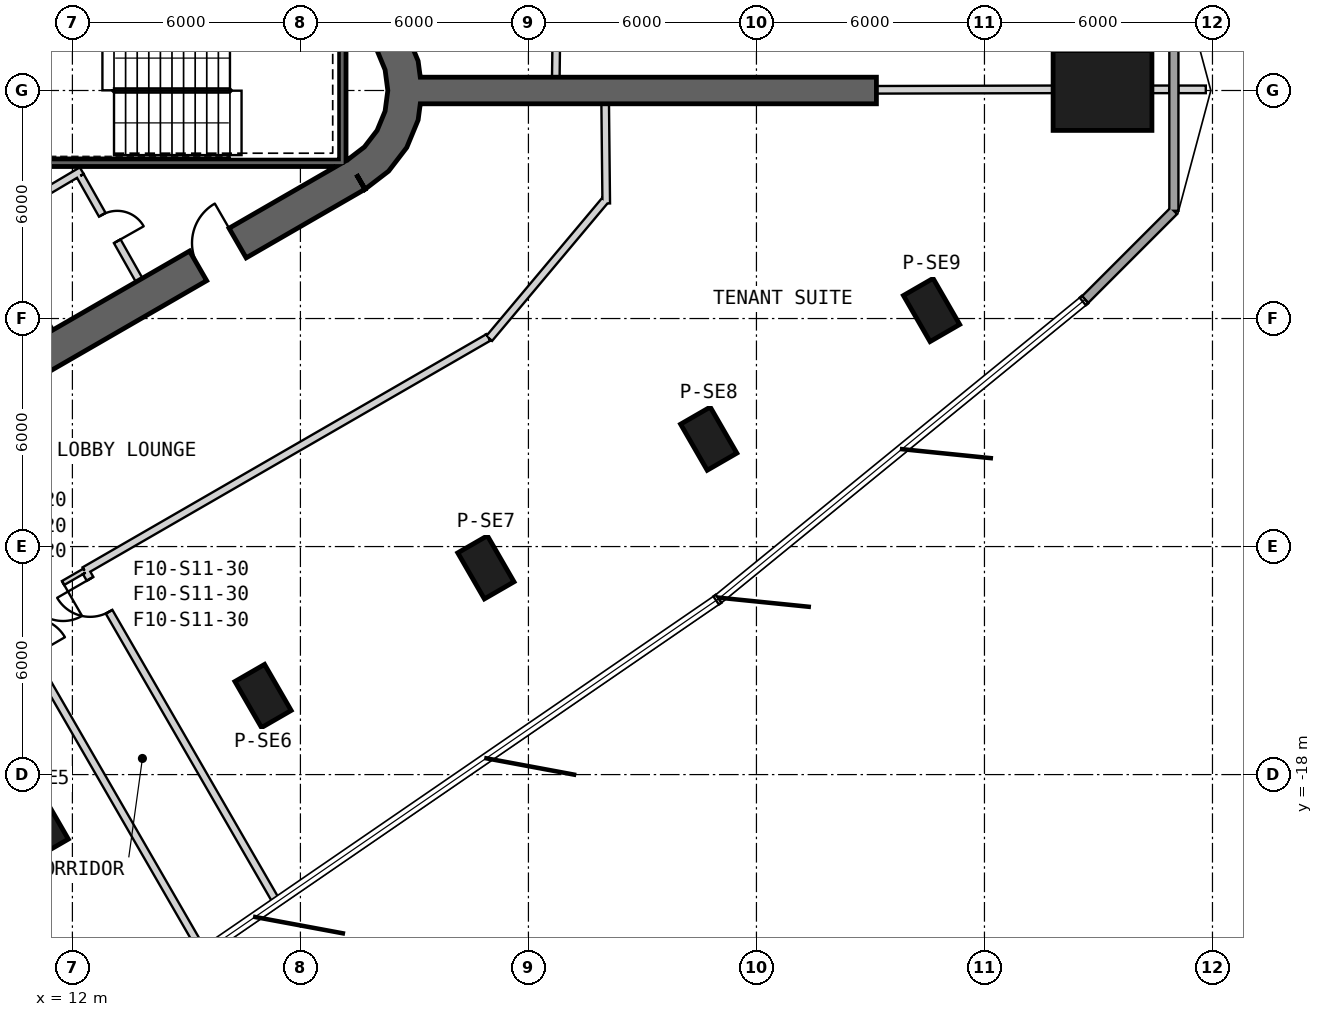
"""IFC4 building model, lengths in metres.
Left out: names, types, materials, properties, quantities, classifications, styles, units other than length and angle.
Written with IfcOpenShell. Run it as: python <this file> out.ifc"""

import sys

from ifc_helpers import new_model, si_unit, direction, frame, frame_2d, origin, origin_2d, place, context, subcontext, project, spatial, polyline, rectangle, outline, extrude, element, fill, save


model = new_model("IFC4")
c1 = context("Model", 3, precision=1e-05, world=origin(), true_north=direction((0.0, 1.0)))
c2 = subcontext(c1, "Body", "Model", "MODEL_VIEW")
j1 = project(units=[si_unit("LENGTHUNIT", "METRE"), si_unit("PLANEANGLEUNIT", "RADIAN")], contexts=[c1])
p1 = place(None, origin())
s1 = spatial("IfcSite", under=j1, at=p1, CompositionType="ELEMENT")
p2 = place(p1, origin())
s2 = spatial("IfcBuilding", under=s1, at=p2, CompositionType="ELEMENT")
p3 = place(p2, frame((0.0, 0.0, 193.2)))
s3 = spatial("IfcBuildingStorey", under=s2, at=p3, CompositionType="ELEMENT", Elevation=193.2)
p4 = place(p3, frame((39.107, 0.0, 0.0), z_axis=(0.0, 0.0, 1.0), x_axis=(1.0, 0.0, 0.0)))
e1 = element("IfcColumn", 1, at=p4, inside=s3, PredefinedType="COLUMN", context=c2, shape_type="SweptSolid", body=[
    extrude(rectangle(XDim=2.6, YDim=2.1, at=origin_2d()), origin(), (0.0, 0.0, 1.0), 4.0),
])
for number, where, z_axis, x_axis in (
    (2, (11.153, -19.317, 0.0), (0.0, 0.0, 1.0), (0.5, -0.866, 0.0)),
    (3, (17.017, -15.932, 0.0), (0.0, 0.0, 1.0), (0.5, -0.866, 0.0)),
    (4, (22.881, -12.546, 0.0), (0.0, 0.0, 1.0), (0.5, -0.866, 0.0)),
    (5, (28.744, -9.161, 0.0), (0.0, 0.0, 1.0), (0.5, -0.866, 0.0)),
    (6, (34.608, -5.775, 0.0), (0.0, 0.0, 1.0), (0.5, -0.866, 0.0)),
):
    element("IfcColumn", number, at=place(p3, frame(where, z_axis=z_axis, x_axis=x_axis)), inside=s3, PredefinedType="COLUMN", context=c2, shape_type="SweptSolid", body=[
        extrude(rectangle(XDim=1.4, YDim=0.9, at=origin_2d()), origin(), (0.0, 0.0, 1.0), 4.0),
    ])
p5 = place(p3, frame((-7.825, -17.97, 0.0), z_axis=(0.0, 0.0, 1.0), x_axis=(0.866028369851, 0.499994862586, 0.0)))
e7 = element("IfcWall", 7, at=p5, inside=s3, PredefinedType="SHEAR", context=c2, shape_type="SweptSolid", body=[
    extrude(rectangle(XDim=31.523, YDim=0.9, at=frame_2d((15.762, 0.0))), origin(), (0.0, 0.0, 1.0), 4.0),
])
p6 = place(p5, frame((7.062, 0.0, 0.0)))
e8 = element("IfcOpeningElement", 8, at=p6, cuts=e7, PredefinedType="OPENING", context=c2, shape_type="SweptSolid", body=[
    extrude(rectangle(XDim=1.2, YDim=2.4, at=frame_2d((0.6, 1.2))), frame((0.0, 0.46, 0.0), z_axis=(0.0, -1.0, 0.0), x_axis=(1.0, 0.0, 0.0)), (0.0, 0.0, 1.0), 0.92),
])
p7 = place(p5, frame((9.762, 0.0, 0.0)))
e9 = element("IfcOpeningElement", 9, at=p7, cuts=e7, PredefinedType="OPENING", context=c2, shape_type="SweptSolid", body=[
    extrude(rectangle(XDim=1.2, YDim=2.4, at=frame_2d((0.6, 1.2))), frame((0.0, 0.46, 0.0), z_axis=(0.0, -1.0, 0.0), x_axis=(1.0, 0.0, 0.0)), (0.0, 0.0, 1.0), 0.92),
])
p8 = place(p5, frame((12.462, 0.0, 0.0)))
e10 = element("IfcOpeningElement", 10, at=p8, cuts=e7, PredefinedType="OPENING", context=c2, shape_type="SweptSolid", body=[
    extrude(rectangle(XDim=1.2, YDim=2.4, at=frame_2d((0.6, 1.2))), frame((0.0, 0.46, 0.0), z_axis=(0.0, -1.0, 0.0), x_axis=(1.0, 0.0, 0.0)), (0.0, 0.0, 1.0), 0.92),
])
p9 = place(p5, frame((15.162, 0.0, 0.0)))
e11 = element("IfcOpeningElement", 11, at=p9, cuts=e7, PredefinedType="OPENING", context=c2, shape_type="SweptSolid", body=[
    extrude(rectangle(XDim=1.2, YDim=2.4, at=frame_2d((0.6, 1.2))), frame((0.0, 0.46, 0.0), z_axis=(0.0, -1.0, 0.0), x_axis=(1.0, 0.0, 0.0)), (0.0, 0.0, 1.0), 0.92),
])
p10 = place(p5, frame((17.862, 0.0, 0.0)))
e12 = element("IfcOpeningElement", 12, at=p10, cuts=e7, PredefinedType="OPENING", context=c2, shape_type="SweptSolid", body=[
    extrude(rectangle(XDim=1.2, YDim=2.4, at=frame_2d((0.6, 1.2))), frame((0.0, 0.46, 0.0), z_axis=(0.0, -1.0, 0.0), x_axis=(1.0, 0.0, 0.0)), (0.0, 0.0, 1.0), 0.92),
])
p11 = place(p5, frame((20.562, 0.0, 0.0)))
e13 = element("IfcOpeningElement", 13, at=p11, cuts=e7, PredefinedType="OPENING", context=c2, shape_type="SweptSolid", body=[
    extrude(rectangle(XDim=1.2, YDim=2.4, at=frame_2d((0.6, 1.2))), frame((0.0, 0.46, 0.0), z_axis=(0.0, -1.0, 0.0), x_axis=(1.0, 0.0, 0.0)), (0.0, 0.0, 1.0), 0.92),
])
p12 = place(p5, frame((26.712, 0.0, 0.0)))
e14 = element("IfcOpeningElement", 14, at=p12, cuts=e7, PredefinedType="OPENING", context=c2, shape_type="SweptSolid", body=[
    extrude(rectangle(XDim=1.2, YDim=2.4, at=frame_2d((0.6, 1.2))), frame((0.0, 0.46, 0.0), z_axis=(0.0, -1.0, 0.0), x_axis=(1.0, 0.0, 0.0)), (0.0, 0.0, 1.0), 0.92),
])
p13 = place(p5, frame((3.612, 0.0, 0.0)))
e15 = element("IfcOpeningElement", 15, at=p13, cuts=e7, PredefinedType="OPENING", context=c2, shape_type="SweptSolid", body=[
    extrude(rectangle(XDim=1.2, YDim=2.4, at=frame_2d((0.6, 1.2))), frame((0.0, 0.46, 0.0), z_axis=(0.0, -1.0, 0.0), x_axis=(1.0, 0.0, 0.0)), (0.0, 0.0, 1.0), 0.92),
])
p14 = place(p3, origin())
e16 = element("IfcWall", 16, at=p14, inside=s3, PredefinedType="SHEAR", context=c2, shape_type="SweptSolid", body=[
    extrude(outline(polyline([(19.7, -2.598), (20.321, -2.121), (20.798, -1.5), (21.098, -0.777), (21.2, 0.0), (21.098, 0.777), (20.798, 1.5), (20.321, 2.121), (19.7, 2.598), (19.25, 1.819), (19.685, 1.485), (20.019, 1.05), (20.229, 0.543), (20.3, 0.0), (20.229, -0.543), (20.019, -1.05), (19.685, -1.485), (19.25, -1.819), (19.7, -2.598)])), origin(), (0.0, 0.0, 1.0), 4.0),
])
p15 = place(p3, frame((21.15, 0.0, 0.0), z_axis=(0.0, 0.0, 1.0), x_axis=(1.0, 0.0, 0.0)))
e17 = element("IfcWall", 17, at=p15, inside=s3, PredefinedType="SHEAR", context=c2, shape_type="SweptSolid", body=[
    extrude(rectangle(XDim=12.007, YDim=0.7, at=frame_2d((6.003, 0.0))), origin(), (0.0, 0.0, 1.0), 4.0),
])
p16 = place(p3, frame((38.649, -5.501, 0.0), z_axis=(0.0, 0.0, 1.0), x_axis=(0.707106781187, 0.707106781187, 0.0)))
e18 = element("IfcWall", 18, at=p16, inside=s3, PredefinedType="SOLIDWALL", context=c2, shape_type="SweptSolid", body=[
    extrude(rectangle(XDim=3.303, YDim=0.24, at=frame_2d((1.652, 0.0))), origin(), (0.0, 0.0, 1.0), 3.7),
])
p17 = place(p3, frame((40.984, -3.165, 0.0), z_axis=(0.0, 0.0, 1.0), x_axis=(0.0, 1.0, 0.0)))
e19 = element("IfcWall", 19, at=p17, inside=s3, PredefinedType="SOLIDWALL", context=c2, shape_type="SweptSolid", body=[
    extrude(rectangle(XDim=6.331, YDim=0.24, at=frame_2d((3.165, 0.0))), origin(), (0.0, 0.0, 1.0), 3.7),
])
p18 = place(p3, frame((9.795, -3.525, 0.0), z_axis=(0.0, 0.0, 1.0), x_axis=(0.499984717929, -0.866034226713, 0.0)))
e20 = element("IfcWall", 20, at=p18, inside=s3, PredefinedType="PLUMBINGWALL", context=c2, shape_type="SweptSolid", body=[
    extrude(rectangle(XDim=3.25, YDim=0.2, at=frame_2d((1.625, 0.0))), origin(), (0.0, 0.0, 1.0), 3.7),
])
p19 = place(p3, frame((19.1, -2.0, -0.3), z_axis=(0.0, 0.0, 1.0), x_axis=(0.0, 1.0, 0.0)))
e21 = element("IfcWall", 21, at=p19, inside=s3, PredefinedType="SHEAR", context=c2, shape_type="SweptSolid", body=[
    extrude(rectangle(XDim=3.8, YDim=0.2, at=frame_2d((1.9, 0.0))), origin(), (0.0, 0.0, 1.0), 4.0),
])
p20 = place(p3, frame((11.1, -1.9, -0.3), z_axis=(0.0, 0.0, 1.0), x_axis=(1.0, 0.0, 0.0)))
e22 = element("IfcWall", 22, at=p20, inside=s3, PredefinedType="SHEAR", context=c2, shape_type="SweptSolid", body=[
    extrude(rectangle(XDim=7.9, YDim=0.2, at=frame_2d((3.95, 0.0))), origin(), (0.0, 0.0, 1.0), 4.0),
])
p21 = place(p3, frame((12.245, -2.109, 0.0), z_axis=(0.0, 0.0, 1.0), x_axis=(-0.860414880418, -0.509594185166, 0.0)))
e23 = element("IfcWall", 23, at=p21, inside=s3, PredefinedType="PARTITIONING", context=c2, shape_type="SweptSolid", body=[
    extrude(rectangle(XDim=2.7, YDim=0.2, at=frame_2d((1.35, 0.0))), origin(), (0.0, 0.0, 1.0), 3.7),
])
p22 = place(p3, frame((13.758, -4.99, 0.0), z_axis=(0.0, 0.0, 1.0), x_axis=(-0.491993409184, 0.87059892334, 0.0)))
e24 = element("IfcWall", 24, at=p22, inside=s3, PredefinedType="PARTITIONING", context=c2, shape_type="SweptSolid", body=[
    extrude(rectangle(XDim=3.15, YDim=0.2, at=frame_2d((1.575, 0.0))), origin(), (0.0, 0.0, 1.0), 3.7),
])
p23 = place(p22, frame((1.175, 0.0, 0.0)))
e25 = element("IfcOpeningElement", 25, at=p23, cuts=e24, PredefinedType="OPENING", context=c2, shape_type="SweptSolid", body=[
    extrude(rectangle(XDim=0.8, YDim=2.1, at=frame_2d((0.4, 1.05))), frame((0.0, 0.11, 0.0), z_axis=(0.0, -1.0, 0.0), x_axis=(1.0, 0.0, 0.0)), (0.0, 0.0, 1.0), 0.22),
])
p24 = place(p3, frame((24.721, 0.35, 0.0), z_axis=(0.0, 0.0, 1.0), x_axis=(0.012552857034, 0.999921209786, 0.0)))
e26 = element("IfcWall", 26, at=p24, inside=s3, PredefinedType="PARTITIONING", context=c2, shape_type="SweptSolid", body=[
    extrude(rectangle(XDim=1.984, YDim=0.2, at=frame_2d((0.992, 0.0))), origin(), (0.0, 0.0, 1.0), 3.7),
])
p25 = place(p3, frame((12.317, -12.634, 0.0), z_axis=(0.0, 0.0, 1.0), x_axis=(-0.86602648383, -0.499998129301, 0.0)))
e27 = element("IfcWall", 27, at=p25, inside=s3, PredefinedType="PARTITIONING", context=c2, shape_type="SweptSolid", body=[
    extrude(rectangle(XDim=2.3, YDim=0.12, at=frame_2d((1.15, 0.0))), origin(), (0.0, 0.0, 1.0), 3.7),
])
p26 = place(p25, frame((0.65, 0.0, 0.0)))
e28 = element("IfcOpeningElement", 28, at=p26, cuts=e27, PredefinedType="OPENING", context=c2, shape_type="SweptSolid", body=[
    extrude(rectangle(XDim=1.0, YDim=2.1, at=frame_2d((0.5, 1.05))), frame((0.0, 0.07, 0.0), z_axis=(0.0, -1.0, 0.0), x_axis=(1.0, 0.0, 0.0)), (0.0, 0.0, 1.0), 0.14),
])
p27 = place(p3, frame((26.047, -2.972, 0.0), z_axis=(0.0, 0.0, 1.0), x_axis=(-0.010519853563, 0.99994466481, 0.0)))
e29 = element("IfcWall", 29, at=p27, inside=s3, PredefinedType="PARTITIONING", context=c2, shape_type="SweptSolid", body=[
    extrude(rectangle(XDim=2.623, YDim=0.2, at=frame_2d((1.311, 0.0))), origin(), (0.0, 0.0, 1.0), 3.7),
])
p28 = place(p3, frame((22.968, -6.524, 0.0), z_axis=(0.0, 0.0, 1.0), x_axis=(0.642764400317, 0.766063917493, 0.0)))
e30 = element("IfcWall", 30, at=p28, inside=s3, PredefinedType="PARTITIONING", context=c2, shape_type="SweptSolid", body=[
    extrude(rectangle(XDim=4.74, YDim=0.2, at=frame_2d((2.37, 0.0))), origin(), (0.0, 0.0, 1.0), 2.78),
])
p29 = place(p3, frame((12.317, -12.634, 0.0), z_axis=(0.0, 0.0, 1.0), x_axis=(0.866028561818, 0.499994530085, 0.0)))
e31 = element("IfcWall", 31, at=p29, inside=s3, PredefinedType="PARTITIONING", context=c2, shape_type="SweptSolid", body=[
    extrude(rectangle(XDim=12.273, YDim=0.2, at=frame_2d((6.136, 0.0))), origin(), (0.0, 0.0, 1.0), 2.88),
])
p30 = place(p3, frame((33.157, 0.018, 0.0), z_axis=(0.0, 0.0, 1.0), x_axis=(0.999996690576, 0.002572710167, 0.0)))
e32 = element("IfcWall", 32, at=p30, inside=s3, PredefinedType="PARTITIONING", context=c2, shape_type="SweptSolid", body=[
    extrude(rectangle(XDim=4.65, YDim=0.2, at=frame_2d((2.325, 0.0))), origin(), (0.0, 0.0, 1.0), 3.27),
])
p31 = place(p3, frame((40.407, 0.03, 0.0), z_axis=(0.0, 0.0, 1.0), x_axis=(1.0, 0.0, 0.0)))
e33 = element("IfcWall", 33, at=p31, inside=s3, PredefinedType="PARTITIONING", context=c2, shape_type="SweptSolid", body=[
    extrude(rectangle(XDim=0.458, YDim=0.2, at=frame_2d((0.229, 0.0))), origin(), (0.0, 0.0, 1.0), 3.7),
])
p32 = place(p3, frame((41.104, 0.03, 0.0), z_axis=(0.0, 0.0, 1.0), x_axis=(1.0, 0.0, 0.0)))
e34 = element("IfcWall", 34, at=p32, inside=s3, PredefinedType="PARTITIONING", context=c2, shape_type="SweptSolid", body=[
    extrude(rectangle(XDim=0.72, YDim=0.2, at=frame_2d((0.36, 0.0))), origin(), (0.0, 0.0, 1.0), 3.7),
])
p33 = place(p3, frame((17.375, -21.355, 0.0), z_axis=(0.0, 0.0, 1.0), x_axis=(-0.500014165022, 0.866017225451, 0.0)))
e35 = element("IfcWall", 35, at=p33, inside=s3, PredefinedType="PARTITIONING", context=c2, shape_type="SweptSolid", body=[
    extrude(rectangle(XDim=10.022, YDim=0.2, at=frame_2d((5.011, 0.0))), origin(), (0.0, 0.0, 1.0), 3.7),
])
p34 = place(p33, frame((8.822, 0.0, 0.0)))
e36 = element("IfcOpeningElement", 36, at=p34, cuts=e35, PredefinedType="OPENING", context=c2, shape_type="SweptSolid", body=[
    extrude(rectangle(XDim=1.0, YDim=2.1, at=frame_2d((0.5, 1.05))), frame((0.0, 0.11, 0.0), z_axis=(0.0, -1.0, 0.0), x_axis=(1.0, 0.0, 0.0)), (0.0, 0.0, 1.0), 0.22),
])
p35 = place(p3, frame((10.338, -13.846, 0.0), z_axis=(0.0, 0.0, 1.0), x_axis=(0.499983401189, -0.8660349869, 0.0)))
e37 = element("IfcWall", 37, at=p35, inside=s3, PredefinedType="PARTITIONING", context=c2, shape_type="SweptSolid", body=[
    extrude(rectangle(XDim=10.204, YDim=0.2, at=frame_2d((5.102, 0.0))), origin(), (0.0, 0.0, 1.0), 3.7),
])
p36 = place(p35, frame((0.2, 0.0, 0.0)))
e38 = element("IfcOpeningElement", 38, at=p36, cuts=e37, PredefinedType="OPENING", context=c2, shape_type="SweptSolid", body=[
    extrude(rectangle(XDim=1.0, YDim=2.1, at=frame_2d((0.5, 1.05))), frame((0.0, 0.11, 0.0), z_axis=(0.0, -1.0, 0.0), x_axis=(1.0, 0.0, 0.0)), (0.0, 0.0, 1.0), 0.22),
])
p37 = place(p23, origin())
e39 = element("IfcDoor", 39, at=p37, inside=s3, OperationType="SINGLE_SWING_LEFT", PredefinedType="USERDEFINED", context=c2, shape_type="SweptSolid", body=[
    extrude(rectangle(XDim=0.8, YDim=2.1, at=frame_2d((0.4, 1.05))), frame((0.0, 0.025, 0.0), z_axis=(0.0, -1.0, 0.0), x_axis=(1.0, 0.0, 0.0)), (0.0, 0.0, 1.0), 0.05),
])
fill(e25, e39)
p38 = place(p26, origin())
e40 = element("IfcDoor", 40, at=p38, inside=s3, OperationType="SINGLE_SWING_RIGHT", PredefinedType="NOTDEFINED", context=c2, shape_type="SweptSolid", body=[
    extrude(rectangle(XDim=1.0, YDim=2.1, at=frame_2d((0.5, 1.05))), frame((0.0, 0.025, 0.0), z_axis=(0.0, -1.0, 0.0), x_axis=(1.0, 0.0, 0.0)), (0.0, 0.0, 1.0), 0.05),
])
fill(e28, e40)
p39 = place(p34, origin())
e41 = element("IfcDoor", 41, at=p39, inside=s3, OperationType="SINGLE_SWING_LEFT", PredefinedType="USERDEFINED", context=c2, shape_type="SweptSolid", body=[
    extrude(rectangle(XDim=1.0, YDim=2.1, at=frame_2d((0.5, 1.05))), frame((0.0, 0.025, 0.0), z_axis=(0.0, -1.0, 0.0), x_axis=(1.0, 0.0, 0.0)), (0.0, 0.0, 1.0), 0.05),
])
fill(e36, e41)
p40 = place(p12, origin())
e42 = element("IfcDoor", 42, at=p40, inside=s3, OperationType="SINGLE_SWING_RIGHT", PredefinedType="USERDEFINED", context=c2, shape_type="SweptSolid", body=[
    extrude(rectangle(XDim=1.2, YDim=2.4, at=frame_2d((0.6, 1.2))), frame((0.0, 0.025, 0.0), z_axis=(0.0, -1.0, 0.0), x_axis=(1.0, 0.0, 0.0)), (0.0, 0.0, 1.0), 0.05),
])
fill(e14, e42)
save(model, sys.argv[1])
